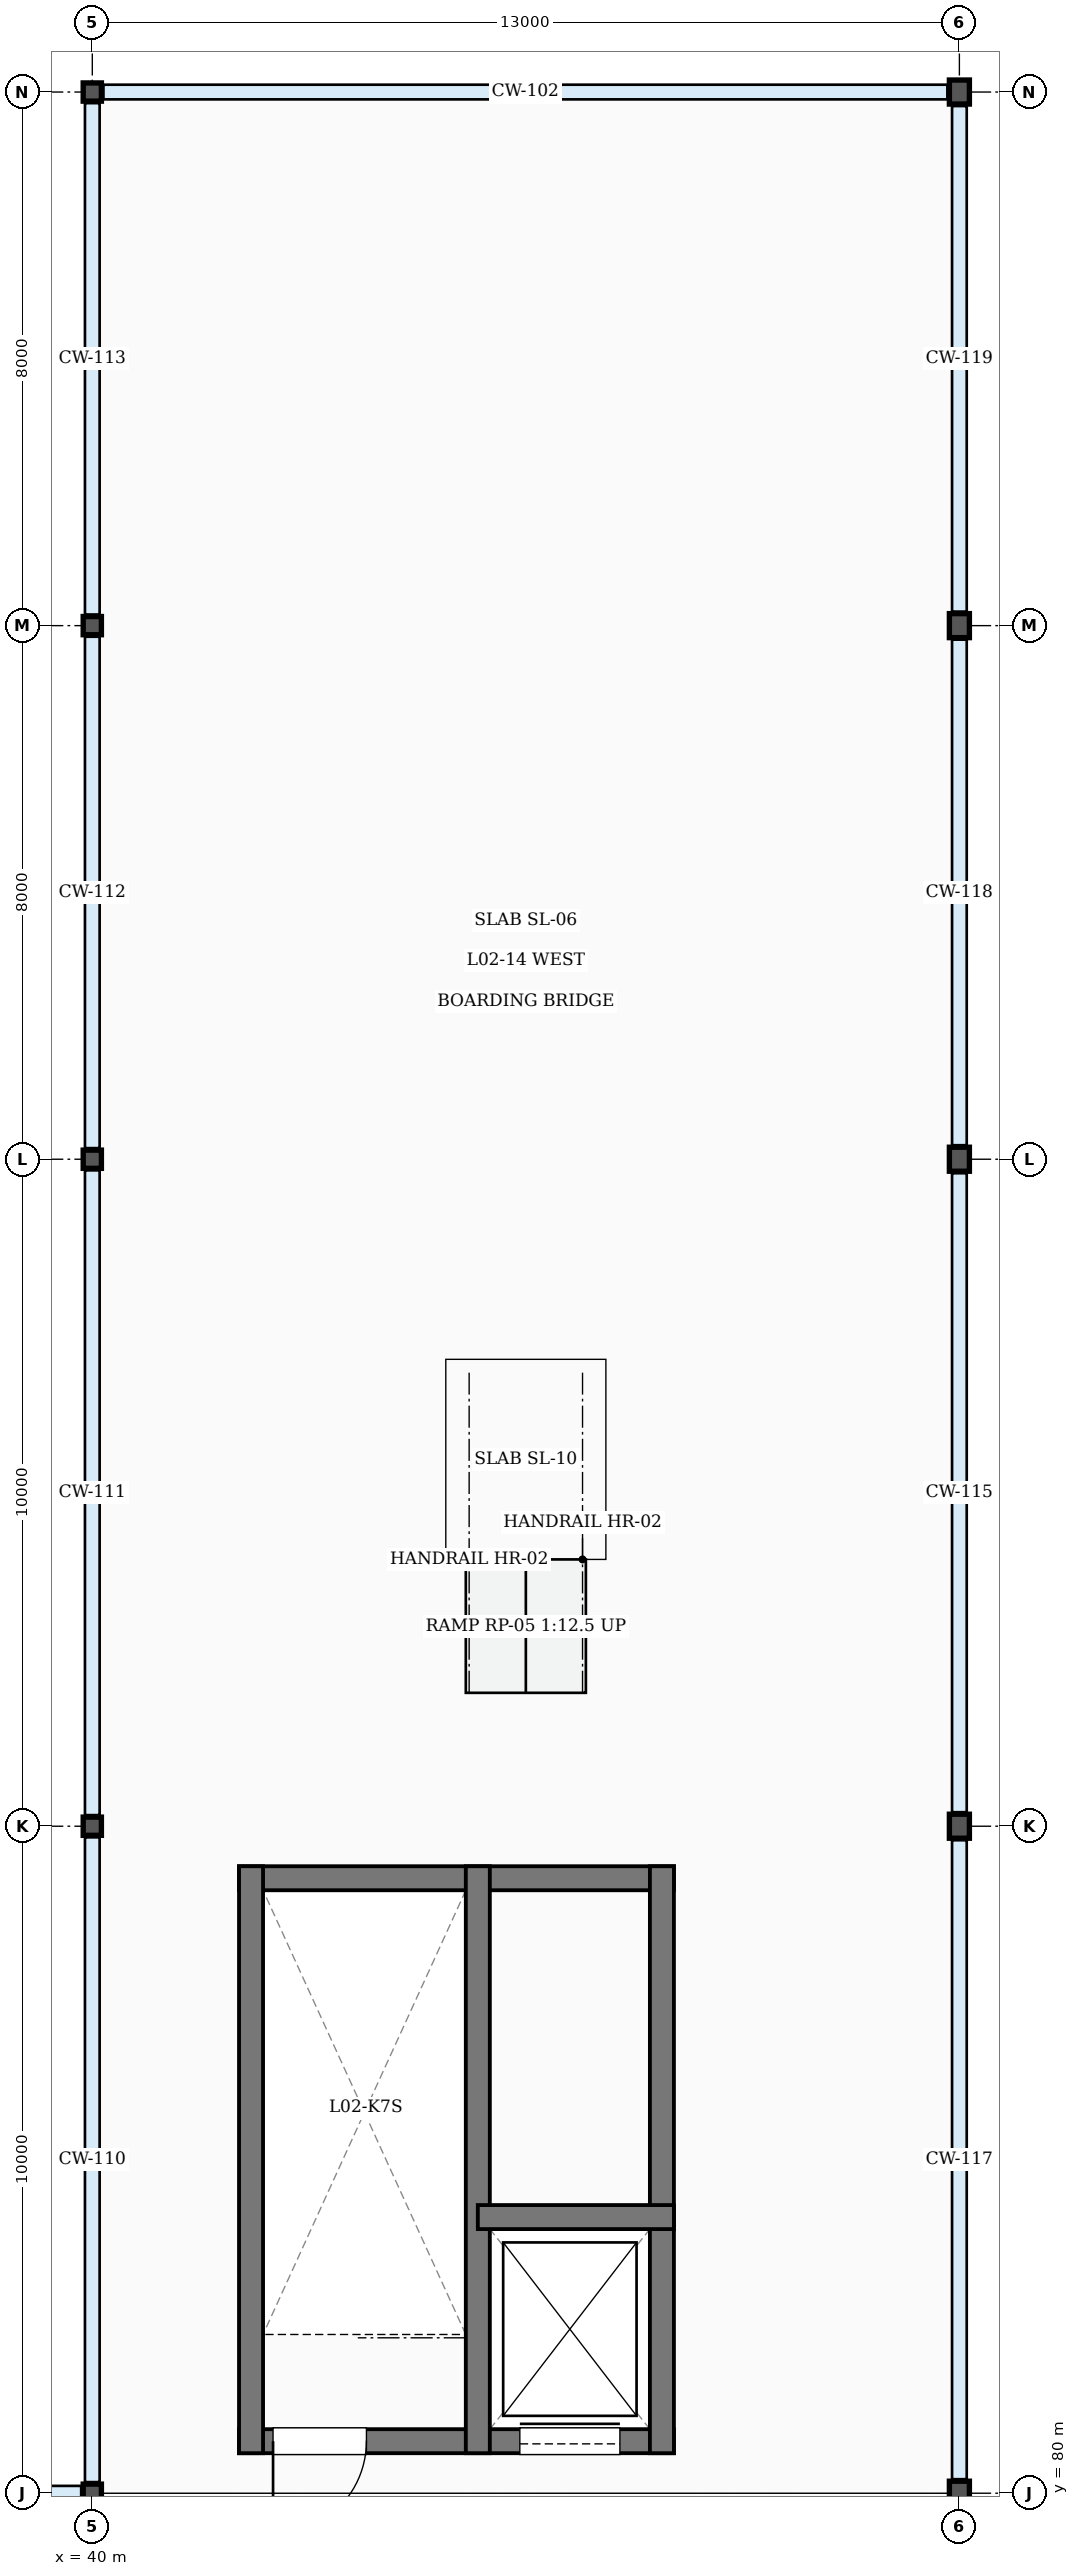
"""IFC4 building model, lengths in metres.
Left out: names, types, materials, properties, quantities, classifications, styles, units other than length and angle.
Written with IfcOpenShell. Run it as: python <this file> out.ifc"""

import sys

from ifc_helpers import new_model, si_unit, direction, frame, frame_2d, origin, origin_2d, place, context, subcontext, project, spatial, rectangle, hollow_circle, i_section, extrude, element, fill, save


model = new_model("IFC4")
c1 = context("Model", 3, precision=1e-05, world=origin(), true_north=direction((0.0, 1.0)))
c2 = subcontext(c1, "Body", "Model", "MODEL_VIEW")
j1 = project(units=[si_unit("LENGTHUNIT", "METRE"), si_unit("PLANEANGLEUNIT", "RADIAN")], contexts=[c1])
p1 = place(None, origin())
s1 = spatial("IfcSite", under=j1, at=p1, CompositionType="ELEMENT")
p2 = place(p1, origin())
s2 = spatial("IfcBuilding", under=s1, at=p2, CompositionType="ELEMENT")
p3 = place(p2, frame((0.0, 0.0, 10.2)))
s3 = spatial("IfcBuildingStorey", under=s2, at=p3, CompositionType="ELEMENT", Elevation=10.2)
for number, where, z_axis, x_axis in (
    (1, (40.0, 80.0, 0.0), (0.0, 0.0, 1.0), (1.0, 0.0, 0.0)),
    (2, (40.0, 90.0, 0.0), (0.0, 0.0, 1.0), (1.0, 0.0, 0.0)),
    (3, (40.0, 100.0, 0.0), (0.0, 0.0, 1.0), (1.0, 0.0, 0.0)),
    (4, (40.0, 108.0, 0.0), (0.0, 0.0, 1.0), (1.0, 0.0, 0.0)),
    (5, (40.0, 116.0, 0.0), (0.0, 0.0, 1.0), (1.0, 0.0, 0.0)),
):
    element("IfcColumn", number, at=place(p3, frame(where, z_axis=z_axis, x_axis=x_axis)), inside=s3, PredefinedType="COLUMN", context=c2, shape_type="SweptSolid", body=[
        extrude(hollow_circle(Radius=0.136, WallThickness=0.012, at=origin_2d()), origin(), (0.0, 0.0, 1.0), 4.2),
    ])
for number, where, z_axis, x_axis in (
    (6, (53.0, 80.0, 0.0), (0.0, 0.0, 1.0), (1.0, 0.0, 0.0)),
    (7, (53.0, 90.0, 0.0), (0.0, 0.0, 1.0), (1.0, 0.0, 0.0)),
    (8, (53.0, 100.0, 0.0), (0.0, 0.0, 1.0), (1.0, 0.0, 0.0)),
    (9, (53.0, 108.0, 0.0), (0.0, 0.0, 1.0), (1.0, 0.0, 0.0)),
    (10, (53.0, 116.0, 0.0), (0.0, 0.0, 1.0), (1.0, 0.0, 0.0)),
):
    element("IfcColumn", number, at=place(p3, frame(where, z_axis=z_axis, x_axis=x_axis)), inside=s3, PredefinedType="COLUMN", context=c2, shape_type="SweptSolid", body=[
        extrude(i_section(OverallWidth=0.3, OverallDepth=0.36, WebThickness=0.012, FlangeThickness=0.022, FilletRadius=0.027, at=origin_2d()), origin(), (0.0, 0.0, 1.0), 4.2),
    ])
p4 = place(p3, frame((42.2, 80.78, 0.0), z_axis=(0.0, 0.0, 1.0), x_axis=(1.0, 0.0, 0.0)))
e11 = element("IfcWall", 11, at=p4, inside=s3, PredefinedType="SHEAR", context=c2, shape_type="SweptSolid", body=[
    extrude(rectangle(XDim=6.52, YDim=0.36, at=frame_2d((3.26, 0.0))), origin(), (0.0, 0.0, 1.0), 3.65),
])
p5 = place(p4, frame((0.51, 0.0, 0.0)))
e12 = element("IfcOpeningElement", 12, at=p5, cuts=e11, PredefinedType="OPENING", context=c2, shape_type="SweptSolid", body=[
    extrude(rectangle(XDim=1.4, YDim=2.35, at=frame_2d((0.7, 1.175))), frame((0.0, 0.19, 0.0), z_axis=(0.0, -1.0, 0.0), x_axis=(1.0, 0.0, 0.0)), (0.0, 0.0, 1.0), 0.38),
])
p6 = place(p4, frame((4.21, 0.0, 0.0)))
e13 = element("IfcOpeningElement", 13, at=p6, cuts=e11, PredefinedType="OPENING", context=c2, shape_type="SweptSolid", body=[
    extrude(rectangle(XDim=1.5, YDim=2.4, at=frame_2d((0.75, 1.2))), frame((0.0, 0.19, 0.0), z_axis=(0.0, -1.0, 0.0), x_axis=(1.0, 0.0, 0.0)), (0.0, 0.0, 1.0), 0.38),
])
p7 = place(p3, frame((42.2, 89.22, 0.0), z_axis=(0.0, 0.0, 1.0), x_axis=(1.0, 0.0, 0.0)))
e14 = element("IfcWall", 14, at=p7, inside=s3, PredefinedType="SHEAR", context=c2, shape_type="SweptSolid", body=[
    extrude(rectangle(XDim=6.52, YDim=0.36, at=frame_2d((3.26, 0.0))), origin(), (0.0, 0.0, 1.0), 3.65),
])
for number, where, z_axis, x_axis in (
    (15, (42.38, 80.6, 0.0), (0.0, 0.0, 1.0), (0.0, 1.0, 0.0)),
    (16, (48.54, 80.6, 0.0), (0.0, 0.0, 1.0), (0.0, 1.0, 0.0)),
    (17, (45.78, 80.6, 0.0), (0.0, 0.0, 1.0), (0.0, 1.0, 0.0)),
):
    element("IfcWall", number, at=place(p3, frame(where, z_axis=z_axis, x_axis=x_axis)), inside=s3, PredefinedType="SHEAR", context=c2, shape_type="SweptSolid", body=[
        extrude(rectangle(XDim=8.8, YDim=0.36, at=frame_2d((4.4, 0.0))), origin(), (0.0, 0.0, 1.0), 3.65),
    ])
p8 = place(p3, frame((45.78, 84.14, 0.0), z_axis=(0.0, 0.0, 1.0), x_axis=(1.0, 0.0, 0.0)))
e18 = element("IfcWall", 18, at=p8, inside=s3, PredefinedType="SHEAR", context=c2, shape_type="SweptSolid", body=[
    extrude(rectangle(XDim=2.94, YDim=0.36, at=frame_2d((1.47, 0.0))), origin(), (0.0, 0.0, 1.0), 3.65),
])
p9 = place(p5, origin())
e19 = element("IfcDoor", 19, at=p9, inside=s3, OperationType="SINGLE_SWING_LEFT", PredefinedType="DOOR", context=c2, shape_type="SweptSolid", body=[
    extrude(rectangle(XDim=1.4, YDim=2.35, at=frame_2d((0.7, 1.175))), frame((0.0, 0.025, 0.0), z_axis=(0.0, -1.0, 0.0), x_axis=(1.0, 0.0, 0.0)), (0.0, 0.0, 1.0), 0.05),
])
fill(e12, e19)
p10 = place(p6, origin())
e20 = element("IfcDoor", 20, at=p10, inside=s3, OperationType="SLIDING_TO_LEFT", PredefinedType="DOOR", context=c2, shape_type="SweptSolid", body=[
    extrude(rectangle(XDim=1.5, YDim=2.4, at=frame_2d((0.75, 1.2))), frame((0.0, 0.025, 0.0), z_axis=(0.0, -1.0, 0.0), x_axis=(1.0, 0.0, 0.0)), (0.0, 0.0, 1.0), 0.05),
])
fill(e13, e20)
save(model, sys.argv[1])
